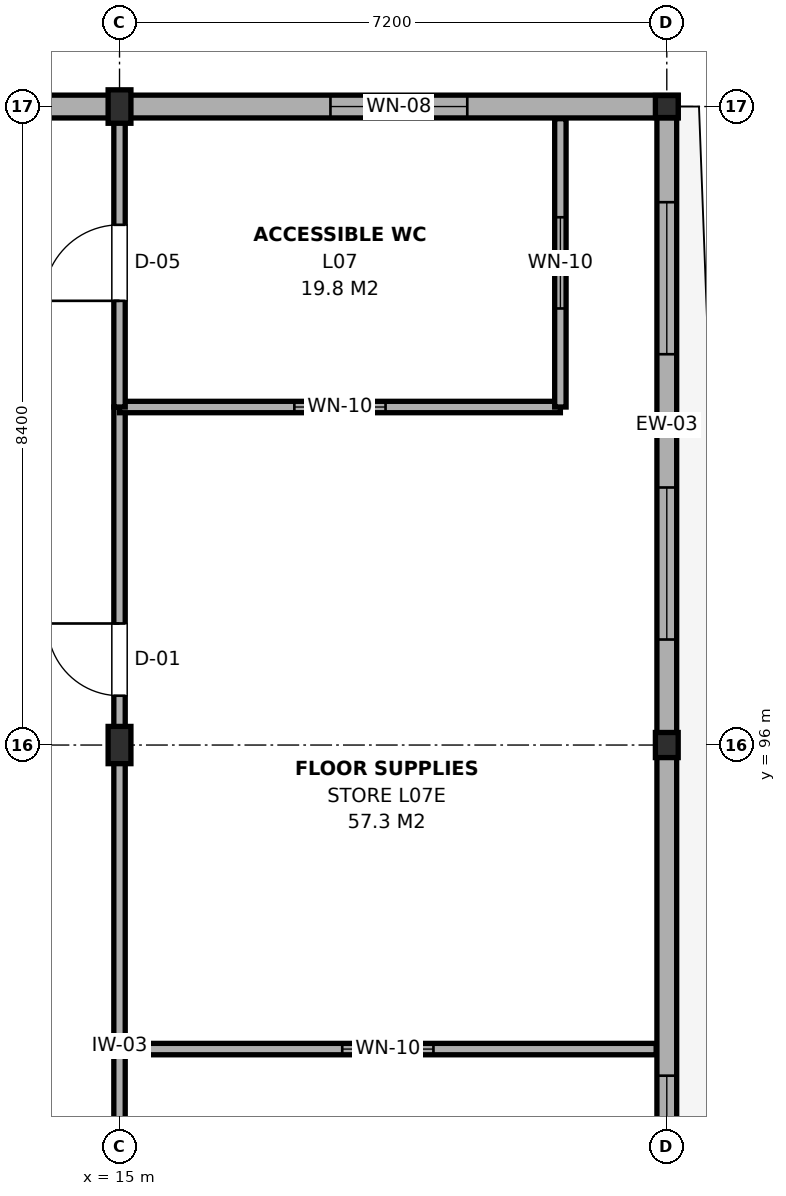
"""IFC4 building model, lengths in metres.
Left out: names, types, materials, properties, quantities, classifications, styles, units other than length and angle.
Written with IfcOpenShell. Run it as: python <this file> out.ifc"""

import sys

from ifc_helpers import new_model, si_unit, direction, frame, frame_2d, origin, origin_2d, place, context, subcontext, project, spatial, rectangle, i_section, extrude, element, fill, save


model = new_model("IFC4")
c1 = context("Model", 3, precision=1e-05, world=origin(), true_north=direction((0.0, 1.0)))
c2 = subcontext(c1, "Body", "Model", "MODEL_VIEW")
j1 = project(units=[si_unit("LENGTHUNIT", "METRE"), si_unit("PLANEANGLEUNIT", "RADIAN")], contexts=[c1])
p1 = place(None, origin())
s1 = spatial("IfcSite", under=j1, at=p1, CompositionType="ELEMENT")
p2 = place(p1, origin())
s2 = spatial("IfcBuilding", under=s1, at=p2, CompositionType="ELEMENT")
p3 = place(p2, frame((0.0, 0.0, 28.8)))
s3 = spatial("IfcBuildingStorey", under=s2, at=p3, CompositionType="ELEMENT", Elevation=28.8)
p4 = place(p3, frame((15.0, 96.0, 0.0), z_axis=(0.0, 0.0, 1.0), x_axis=(1.0, 0.0, 0.0)))
e1 = element("IfcColumn", 1, at=p4, inside=s3, PredefinedType="COLUMN", context=c2, shape_type="SweptSolid", body=[
    extrude(i_section(OverallWidth=0.3, OverallDepth=0.49, WebThickness=0.012, FlangeThickness=0.023, FilletRadius=0.027, at=origin_2d()), origin(), (0.0, 0.0, 1.0), 3.9),
])
p5 = place(p3, frame((15.0, 104.4, 0.0), z_axis=(0.0, 0.0, 1.0), x_axis=(1.0, 0.0, 0.0)))
e2 = element("IfcColumn", 2, at=p5, inside=s3, PredefinedType="COLUMN", context=c2, shape_type="SweptSolid", body=[
    extrude(i_section(OverallWidth=0.3, OverallDepth=0.44, WebThickness=0.011, FlangeThickness=0.021, FilletRadius=0.027, at=origin_2d()), origin(), (0.0, 0.0, 1.0), 3.9),
])
p6 = place(p3, frame((22.2, 96.0, 0.0), z_axis=(0.0, 0.0, 1.0), x_axis=(1.0, 0.0, 0.0)))
e3 = element("IfcColumn", 3, at=p6, inside=s3, PredefinedType="COLUMN", context=c2, shape_type="SweptSolid", body=[
    extrude(i_section(OverallWidth=0.3, OverallDepth=0.33, WebThickness=0.01, FlangeThickness=0.017, FilletRadius=0.027, at=origin_2d()), origin(), (0.0, 0.0, 1.0), 3.72),
])
p7 = place(p3, frame((22.2, 104.4, 0.0), z_axis=(0.0, 0.0, 1.0), x_axis=(1.0, 0.0, 0.0)))
e4 = element("IfcColumn", 4, at=p7, inside=s3, PredefinedType="COLUMN", context=c2, shape_type="SweptSolid", body=[
    extrude(i_section(OverallWidth=0.3, OverallDepth=0.29, WebThickness=0.009, FlangeThickness=0.014, FilletRadius=0.027, at=origin_2d()), origin(), (0.0, 0.0, 1.0), 3.72),
])
p8 = place(p3, frame((22.2, 88.2, 0.0), z_axis=(0.0, 0.0, 1.0), x_axis=(0.0, 1.0, 0.0)))
e5 = element("IfcWall", 5, at=p8, inside=s3, PredefinedType="SOLIDWALL", context=c2, shape_type="SweptSolid", body=[
    extrude(rectangle(XDim=7.8, YDim=0.26, at=frame_2d((3.9, 0.0))), origin(), (0.0, 0.0, 1.0), 3.225),
])
p9 = place(p8, frame((1.45, 0.0, 0.9)))
e6 = element("IfcOpeningElement", 6, at=p9, cuts=e5, PredefinedType="OPENING", context=c2, shape_type="SweptSolid", body=[
    extrude(rectangle(XDim=2.0, YDim=1.8, at=frame_2d((1.0, 0.9))), frame((0.0, 0.145, 0.0), z_axis=(0.0, -1.0, 0.0), x_axis=(1.0, 0.0, 0.0)), (0.0, 0.0, 1.0), 0.29),
])
p10 = place(p3, frame((22.2, 96.0, 0.0), z_axis=(0.0, 0.0, 1.0), x_axis=(0.0, 1.0, 0.0)))
e7 = element("IfcWall", 7, at=p10, inside=s3, PredefinedType="SOLIDWALL", context=c2, shape_type="SweptSolid", body=[
    extrude(rectangle(XDim=8.53, YDim=0.26, at=frame_2d((4.265, 0.0))), origin(), (0.0, 0.0, 1.0), 3.225),
])
p11 = place(p10, frame((1.388, 0.0, 0.9)))
e8 = element("IfcOpeningElement", 8, at=p11, cuts=e7, PredefinedType="OPENING", context=c2, shape_type="SweptSolid", body=[
    extrude(rectangle(XDim=2.0, YDim=1.8, at=frame_2d((1.0, 0.9))), frame((0.0, 0.145, 0.0), z_axis=(0.0, -1.0, 0.0), x_axis=(1.0, 0.0, 0.0)), (0.0, 0.0, 1.0), 0.29),
])
p12 = place(p10, frame((5.142, 0.0, 0.9)))
e9 = element("IfcOpeningElement", 9, at=p12, cuts=e7, PredefinedType="OPENING", context=c2, shape_type="SweptSolid", body=[
    extrude(rectangle(XDim=2.0, YDim=1.8, at=frame_2d((1.0, 0.9))), frame((0.0, 0.145, 0.0), z_axis=(0.0, -1.0, 0.0), x_axis=(1.0, 0.0, 0.0)), (0.0, 0.0, 1.0), 0.29),
])
p13 = place(p3, frame((7.8, 104.4, 0.0), z_axis=(0.0, 0.0, 1.0), x_axis=(1.0, 0.0, 0.0)))
e10 = element("IfcWall", 10, at=p13, inside=s3, PredefinedType="SOLIDWALL", context=c2, shape_type="SweptSolid", body=[
    extrude(rectangle(XDim=7.2, YDim=0.3, at=frame_2d((3.6, 0.0))), origin(), (0.0, 0.0, 1.0), 3.115),
])
p14 = place(p13, frame((2.7, 0.0, 0.65)))
e11 = element("IfcOpeningElement", 11, at=p14, cuts=e10, PredefinedType="OPENING", context=c2, shape_type="SweptSolid", body=[
    extrude(rectangle(XDim=1.8, YDim=1.2, at=frame_2d((0.9, 0.6))), frame((0.0, 0.165, 0.0), z_axis=(0.0, -1.0, 0.0), x_axis=(1.0, 0.0, 0.0)), (0.0, 0.0, 1.0), 0.33),
])
p15 = place(p3, frame((15.0, 104.4, 0.0), z_axis=(0.0, 0.0, 1.0), x_axis=(1.0, 0.0, 0.0)))
e12 = element("IfcWall", 12, at=p15, inside=s3, PredefinedType="SOLIDWALL", context=c2, shape_type="SweptSolid", body=[
    extrude(rectangle(XDim=7.35, YDim=0.3, at=frame_2d((3.675, 0.0))), origin(), (0.0, 0.0, 1.0), 3.165),
])
p16 = place(p15, frame((2.775, 0.0, 0.65)))
e13 = element("IfcOpeningElement", 13, at=p16, cuts=e12, PredefinedType="OPENING", context=c2, shape_type="SweptSolid", body=[
    extrude(rectangle(XDim=1.8, YDim=1.2, at=frame_2d((0.9, 0.6))), frame((0.0, 0.165, 0.0), z_axis=(0.0, -1.0, 0.0), x_axis=(1.0, 0.0, 0.0)), (0.0, 0.0, 1.0), 0.33),
])
p17 = place(p3, frame((15.0, 73.8, 0.0), z_axis=(0.0, 0.0, 1.0), x_axis=(0.0, 1.0, 0.0)))
e14 = element("IfcWall", 14, at=p17, inside=s3, PredefinedType="PARTITIONING", context=c2, shape_type="SweptSolid", body=[
    extrude(rectangle(XDim=18.2, YDim=0.15, at=frame_2d((9.1, 0.0))), origin(), (0.0, 0.0, 1.0), 3.165),
])
p18 = place(p17, frame((8.575, 0.0, 0.0)))
e15 = element("IfcOpeningElement", 15, at=p18, cuts=e14, PredefinedType="OPENING", context=c2, shape_type="SweptSolid", body=[
    extrude(rectangle(XDim=1.05, YDim=2.15, at=frame_2d((0.525, 1.075))), frame((0.0, 0.09, 0.0), z_axis=(0.0, -1.0, 0.0), x_axis=(1.0, 0.0, 0.0)), (0.0, 0.0, 1.0), 0.18),
])
p19 = place(p17, frame((3.25, 0.0, 0.95)))
e16 = element("IfcOpeningElement", 16, at=p19, cuts=e14, PredefinedType="OPENING", context=c2, shape_type="SweptSolid", body=[
    extrude(rectangle(XDim=2.6, YDim=1.5, at=frame_2d((1.3, 0.75))), frame((0.0, 0.09, 0.0), z_axis=(0.0, -1.0, 0.0), x_axis=(1.0, 0.0, 0.0)), (0.0, 0.0, 1.0), 0.18),
])
p20 = place(p3, frame((15.0, 92.0, 0.0), z_axis=(0.0, 0.0, 1.0), x_axis=(0.0, 1.0, 0.0)))
e17 = element("IfcWall", 17, at=p20, inside=s3, PredefinedType="PARTITIONING", context=c2, shape_type="SweptSolid", body=[
    extrude(rectangle(XDim=8.447, YDim=0.15, at=frame_2d((4.224, 0.0))), origin(), (0.0, 0.0, 1.0), 3.175),
])
p21 = place(p20, frame((4.649, 0.0, 0.0)))
e18 = element("IfcOpeningElement", 18, at=p21, cuts=e17, PredefinedType="OPENING", context=c2, shape_type="SweptSolid", body=[
    extrude(rectangle(XDim=0.95, YDim=2.15, at=frame_2d((0.475, 1.075))), frame((0.0, 0.09, 0.0), z_axis=(0.0, -1.0, 0.0), x_axis=(1.0, 0.0, 0.0)), (0.0, 0.0, 1.0), 0.18),
])
p22 = place(p3, frame((15.0, 100.447, 0.0), z_axis=(0.0, 0.0, 1.0), x_axis=(1.0, 0.0, 0.0)))
e19 = element("IfcWall", 19, at=p22, inside=s3, PredefinedType="PARTITIONING", context=c2, shape_type="SweptSolid", body=[
    extrude(rectangle(XDim=5.8, YDim=0.15, at=frame_2d((2.9, 0.0))), origin(), (0.0, 0.0, 1.0), 3.175),
])
p23 = place(p22, frame((2.3, 0.0, 0.95)))
e20 = element("IfcOpeningElement", 20, at=p23, cuts=e19, PredefinedType="OPENING", context=c2, shape_type="SweptSolid", body=[
    extrude(rectangle(XDim=1.2, YDim=1.5, at=frame_2d((0.6, 0.75))), frame((0.0, 0.09, 0.0), z_axis=(0.0, -1.0, 0.0), x_axis=(1.0, 0.0, 0.0)), (0.0, 0.0, 1.0), 0.18),
])
p24 = place(p3, frame((20.8, 100.447, 0.0), z_axis=(0.0, 0.0, 1.0), x_axis=(0.0, 1.0, 0.0)))
e21 = element("IfcWall", 21, at=p24, inside=s3, PredefinedType="PARTITIONING", context=c2, shape_type="SweptSolid", body=[
    extrude(rectangle(XDim=3.793, YDim=0.15, at=frame_2d((1.896, 0.0))), origin(), (0.0, 0.0, 1.0), 3.215),
])
p25 = place(p24, frame((1.296, 0.0, 0.95)))
e22 = element("IfcOpeningElement", 22, at=p25, cuts=e21, PredefinedType="OPENING", context=c2, shape_type="SweptSolid", body=[
    extrude(rectangle(XDim=1.2, YDim=1.5, at=frame_2d((0.6, 0.75))), frame((0.0, 0.09, 0.0), z_axis=(0.0, -1.0, 0.0), x_axis=(1.0, 0.0, 0.0)), (0.0, 0.0, 1.0), 0.18),
])
p26 = place(p3, frame((15.0, 100.447, 0.0), z_axis=(0.0, 0.0, 1.0), x_axis=(0.0, 1.0, 0.0)))
e23 = element("IfcWall", 23, at=p26, inside=s3, PredefinedType="PARTITIONING", context=c2, shape_type="SweptSolid", body=[
    extrude(rectangle(XDim=3.793, YDim=0.15, at=frame_2d((1.896, 0.0))), origin(), (0.0, 0.0, 1.0), 3.165),
])
p27 = place(p26, frame((1.397, 0.0, 0.0)))
e24 = element("IfcOpeningElement", 24, at=p27, cuts=e23, PredefinedType="OPENING", context=c2, shape_type="SweptSolid", body=[
    extrude(rectangle(XDim=1.0, YDim=2.15, at=frame_2d((0.5, 1.075))), frame((0.0, 0.09, 0.0), z_axis=(0.0, -1.0, 0.0), x_axis=(1.0, 0.0, 0.0)), (0.0, 0.0, 1.0), 0.18),
])
p28 = place(p3, frame((15.0, 92.0, 0.0), z_axis=(0.0, 0.0, 1.0), x_axis=(1.0, 0.0, 0.0)))
e25 = element("IfcWall", 25, at=p28, inside=s3, PredefinedType="PARTITIONING", context=c2, shape_type="SweptSolid", body=[
    extrude(rectangle(XDim=7.06, YDim=0.15, at=frame_2d((3.53, 0.0))), origin(), (0.0, 0.0, 1.0), 3.365),
])
p29 = place(p28, frame((2.93, 0.0, 0.95)))
e26 = element("IfcOpeningElement", 26, at=p29, cuts=e25, PredefinedType="OPENING", context=c2, shape_type="SweptSolid", body=[
    extrude(rectangle(XDim=1.2, YDim=1.5, at=frame_2d((0.6, 0.75))), frame((0.0, 0.09, 0.0), z_axis=(0.0, -1.0, 0.0), x_axis=(1.0, 0.0, 0.0)), (0.0, 0.0, 1.0), 0.18),
])
p30 = place(p9, origin())
e27 = element("IfcWindow", 27, at=p30, inside=s3, PartitioningType="SINGLE_PANEL", PredefinedType="WINDOW", context=c2, shape_type="SweptSolid", body=[
    extrude(rectangle(XDim=2.0, YDim=1.8, at=frame_2d((1.0, 0.9))), frame((0.0, 0.03, 0.0), z_axis=(0.0, -1.0, 0.0), x_axis=(1.0, 0.0, 0.0)), (0.0, 0.0, 1.0), 0.06),
])
fill(e6, e27)
p31 = place(p11, origin())
e28 = element("IfcWindow", 28, at=p31, inside=s3, PartitioningType="SINGLE_PANEL", PredefinedType="WINDOW", context=c2, shape_type="SweptSolid", body=[
    extrude(rectangle(XDim=2.0, YDim=1.8, at=frame_2d((1.0, 0.9))), frame((0.0, 0.03, 0.0), z_axis=(0.0, -1.0, 0.0), x_axis=(1.0, 0.0, 0.0)), (0.0, 0.0, 1.0), 0.06),
])
fill(e8, e28)
p32 = place(p12, origin())
e29 = element("IfcWindow", 29, at=p32, inside=s3, PartitioningType="SINGLE_PANEL", PredefinedType="WINDOW", context=c2, shape_type="SweptSolid", body=[
    extrude(rectangle(XDim=2.0, YDim=1.8, at=frame_2d((1.0, 0.9))), frame((0.0, 0.03, 0.0), z_axis=(0.0, -1.0, 0.0), x_axis=(1.0, 0.0, 0.0)), (0.0, 0.0, 1.0), 0.06),
])
fill(e9, e29)
p33 = place(p16, origin())
e30 = element("IfcWindow", 30, at=p33, inside=s3, PartitioningType="SINGLE_PANEL", PredefinedType="WINDOW", context=c2, shape_type="SweptSolid", body=[
    extrude(rectangle(XDim=1.8, YDim=1.2, at=frame_2d((0.9, 0.6))), frame((0.0, 0.03, 0.0), z_axis=(0.0, -1.0, 0.0), x_axis=(1.0, 0.0, 0.0)), (0.0, 0.0, 1.0), 0.06),
])
fill(e13, e30)
p34 = place(p21, origin())
e31 = element("IfcDoor", 31, at=p34, inside=s3, OperationType="SINGLE_SWING_RIGHT", PredefinedType="DOOR", context=c2, shape_type="SweptSolid", body=[
    extrude(rectangle(XDim=0.95, YDim=2.15, at=frame_2d((0.475, 1.075))), frame((0.0, 0.025, 0.0), z_axis=(0.0, -1.0, 0.0), x_axis=(1.0, 0.0, 0.0)), (0.0, 0.0, 1.0), 0.05),
])
fill(e18, e31)
p35 = place(p23, origin())
e32 = element("IfcWindow", 32, at=p35, inside=s3, PartitioningType="SINGLE_PANEL", PredefinedType="WINDOW", context=c2, shape_type="SweptSolid", body=[
    extrude(rectangle(XDim=1.2, YDim=1.5, at=frame_2d((0.6, 0.75))), frame((0.0, 0.03, 0.0), z_axis=(0.0, -1.0, 0.0), x_axis=(1.0, 0.0, 0.0)), (0.0, 0.0, 1.0), 0.06),
])
fill(e20, e32)
p36 = place(p25, origin())
e33 = element("IfcWindow", 33, at=p36, inside=s3, PartitioningType="SINGLE_PANEL", PredefinedType="WINDOW", context=c2, shape_type="SweptSolid", body=[
    extrude(rectangle(XDim=1.2, YDim=1.5, at=frame_2d((0.6, 0.75))), frame((0.0, 0.03, 0.0), z_axis=(0.0, -1.0, 0.0), x_axis=(1.0, 0.0, 0.0)), (0.0, 0.0, 1.0), 0.06),
])
fill(e22, e33)
p37 = place(p27, origin())
e34 = element("IfcDoor", 34, at=p37, inside=s3, OperationType="SINGLE_SWING_LEFT", PredefinedType="DOOR", context=c2, shape_type="SweptSolid", body=[
    extrude(rectangle(XDim=1.0, YDim=2.15, at=frame_2d((0.5, 1.075))), frame((0.0, 0.025, 0.0), z_axis=(0.0, -1.0, 0.0), x_axis=(1.0, 0.0, 0.0)), (0.0, 0.0, 1.0), 0.05),
])
fill(e24, e34)
p38 = place(p29, origin())
e35 = element("IfcWindow", 35, at=p38, inside=s3, PartitioningType="SINGLE_PANEL", PredefinedType="WINDOW", context=c2, shape_type="SweptSolid", body=[
    extrude(rectangle(XDim=1.2, YDim=1.5, at=frame_2d((0.6, 0.75))), frame((0.0, 0.03, 0.0), z_axis=(0.0, -1.0, 0.0), x_axis=(1.0, 0.0, 0.0)), (0.0, 0.0, 1.0), 0.06),
])
fill(e26, e35)
save(model, sys.argv[1])
